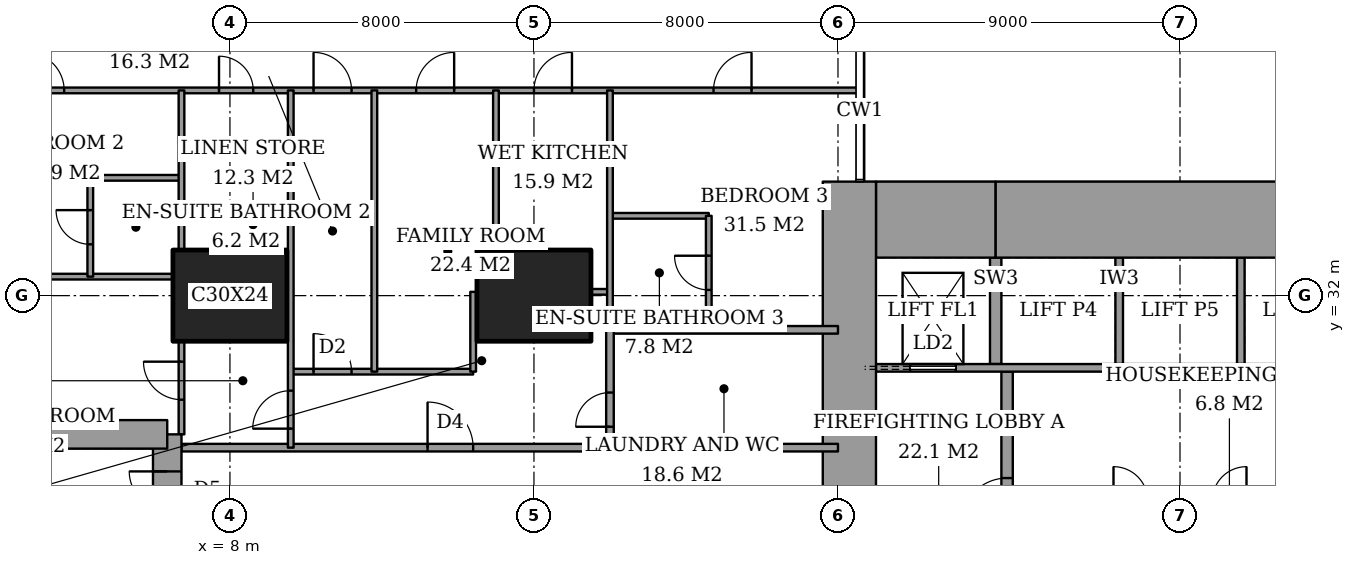
"""IFC4 building model, lengths in metres.
Left out: names, types, materials, properties, quantities, classifications, styles, units other than length and angle.
Written with IfcOpenShell. Run it as: python <this file> out.ifc"""

import sys

from ifc_helpers import new_model, si_unit, direction, frame, frame_2d, origin, origin_2d, place, context, subcontext, project, spatial, rectangle, extrude, element, fill, save


model = new_model("IFC4")
c1 = context("Model", 3, precision=1e-05, world=origin(), true_north=direction((0.0, 1.0)))
c2 = subcontext(c1, "Body", "Model", "MODEL_VIEW")
j1 = project(units=[si_unit("LENGTHUNIT", "METRE"), si_unit("PLANEANGLEUNIT", "RADIAN")], contexts=[c1])
p1 = place(None, origin())
s1 = spatial("IfcSite", under=j1, at=p1, CompositionType="ELEMENT")
p2 = place(p1, origin())
s2 = spatial("IfcBuilding", under=s1, at=p2, CompositionType="ELEMENT")
p3 = place(p2, frame((0.0, 0.0, 51.2)))
s3 = spatial("IfcBuildingStorey", under=s2, at=p3, CompositionType="ELEMENT", Elevation=51.2)
for number, where, z_axis, x_axis in (
    (1, (8.0, 32.0, 0.0), (0.0, 0.0, 1.0), (1.0, 0.0, 0.0)),
    (2, (16.0, 32.0, 0.0), (0.0, 0.0, 1.0), (1.0, 0.0, 0.0)),
):
    element("IfcColumn", number, at=place(p3, frame(where, z_axis=z_axis, x_axis=x_axis)), inside=s3, PredefinedType="COLUMN", context=c2, shape_type="SweptSolid", body=[
        extrude(rectangle(XDim=3.0, YDim=2.4, at=origin_2d()), origin(), (0.0, 0.0, 1.0), 3.6),
    ])
p4 = place(p3, frame((25.0, 34.0, 0.0), z_axis=(0.0, 0.0, 1.0), x_axis=(1.0, 0.0, 0.0)))
e3 = element("IfcWall", 3, at=p4, inside=s3, PredefinedType="SHEAR", context=c2, shape_type="SweptSolid", body=[
    extrude(rectangle(XDim=3.15, YDim=2.0, at=frame_2d((1.575, 0.0))), origin(), (0.0, 0.0, 1.0), 3.6),
])
p5 = place(p3, frame((28.15, 34.0, 0.0), z_axis=(0.0, 0.0, 1.0), x_axis=(1.0, 0.0, 0.0)))
e4 = element("IfcWall", 4, at=p5, inside=s3, PredefinedType="SHEAR", context=c2, shape_type="SweptSolid", body=[
    extrude(rectangle(XDim=9.7, YDim=2.0, at=frame_2d((4.85, 0.0))), origin(), (0.0, 0.0, 1.0), 3.6),
])
p6 = place(p3, frame((24.3, 23.15, 0.0), z_axis=(0.0, 0.0, 1.0), x_axis=(0.0, 1.0, 0.0)))
e5 = element("IfcWall", 5, at=p6, inside=s3, PredefinedType="SHEAR", context=c2, shape_type="SweptSolid", body=[
    extrude(rectangle(XDim=11.85, YDim=1.4, at=frame_2d((5.925, 0.0))), origin(), (0.0, 0.0, 1.0), 3.6),
])
p7 = place(p6, frame((0.75, 0.0, 0.0)))
e6 = element("IfcOpeningElement", 6, at=p7, cuts=e5, PredefinedType="OPENING", context=c2, shape_type="SweptSolid", body=[
    extrude(rectangle(XDim=1.8, YDim=2.4, at=frame_2d((0.9, 1.2))), frame((0.0, 0.71, 0.0), z_axis=(0.0, -1.0, 0.0), x_axis=(1.0, 0.0, 0.0)), (0.0, 0.0, 1.0), 1.42),
])
p8 = place(p3, frame((28.45, 23.3, 0.0), z_axis=(0.0, 0.0, 1.0), x_axis=(0.0, 1.0, 0.0)))
e7 = element("IfcWall", 7, at=p8, inside=s3, PredefinedType="PARTITIONING", context=c2, shape_type="SweptSolid", body=[
    extrude(rectangle(XDim=6.7, YDim=0.3, at=frame_2d((3.35, 0.0))), origin(), (0.0, 0.0, 1.0), 3.6),
])
p9 = place(p8, frame((2.7, 0.0, 0.0)))
e8 = element("IfcOpeningElement", 8, at=p9, cuts=e7, PredefinedType="OPENING", context=c2, shape_type="SweptSolid", body=[
    extrude(rectangle(XDim=1.2, YDim=2.1, at=frame_2d((0.6, 1.05))), frame((0.0, 0.16, 0.0), z_axis=(0.0, -1.0, 0.0), x_axis=(1.0, 0.0, 0.0)), (0.0, 0.0, 1.0), 0.32),
])
p10 = place(p3, frame((6.35, 19.65, 0.0), z_axis=(0.0, 0.0, 1.0), x_axis=(0.0, 1.0, 0.0)))
e9 = element("IfcWall", 9, at=p10, inside=s3, PredefinedType="SHEAR", context=c2, shape_type="SweptSolid", body=[
    extrude(rectangle(XDim=8.7, YDim=0.75, at=frame_2d((4.35, 0.0))), origin(), (0.0, 0.0, 1.0), 3.6),
])
p11 = place(p10, frame((6.725, 0.0, 0.0)))
e10 = element("IfcOpeningElement", 10, at=p11, cuts=e9, PredefinedType="OPENING", context=c2, shape_type="SweptSolid", body=[
    extrude(rectangle(XDim=1.0, YDim=2.1, at=frame_2d((0.5, 1.05))), frame((0.0, 0.385, 0.0), z_axis=(0.0, -1.0, 0.0), x_axis=(1.0, 0.0, 0.0)), (0.0, 0.0, 1.0), 0.77),
])
p12 = place(p3, frame((6.35, 28.35, 0.0), z_axis=(0.0, 0.0, 1.0), x_axis=(-1.0, 0.0, 0.0)))
e11 = element("IfcWall", 11, at=p12, inside=s3, PredefinedType="SHEAR", context=c2, shape_type="SweptSolid", body=[
    extrude(rectangle(XDim=4.45, YDim=0.75, at=frame_2d((2.225, 0.0))), origin(), (0.0, 0.0, 1.0), 3.6),
])
p13 = place(p3, frame((6.725, 28.0, 0.0), z_axis=(0.0, 0.0, 1.0), x_axis=(1.0, 0.0, 0.0)))
e12 = element("IfcWall", 12, at=p13, inside=s3, PredefinedType="PARTITIONING", context=c2, shape_type="SweptSolid", body=[
    extrude(rectangle(XDim=17.275, YDim=0.2, at=frame_2d((8.637, 0.0))), origin(), (0.0, 0.0, 1.0), 3.35),
])
p14 = place(p13, frame((6.475, 0.0, 0.0)))
e13 = element("IfcOpeningElement", 13, at=p14, cuts=e12, PredefinedType="OPENING", context=c2, shape_type="SweptSolid", body=[
    extrude(rectangle(XDim=1.2, YDim=2.4, at=frame_2d((0.6, 1.2))), frame((0.0, 0.11, 0.0), z_axis=(0.0, -1.0, 0.0), x_axis=(1.0, 0.0, 0.0)), (0.0, 0.0, 1.0), 0.22),
])
p15 = place(p3, frame((9.6, 30.0, 0.0), z_axis=(0.0, 0.0, 1.0), x_axis=(1.0, 0.0, 0.0)))
e14 = element("IfcWall", 14, at=p15, inside=s3, PredefinedType="PARTITIONING", context=c2, shape_type="SweptSolid", body=[
    extrude(rectangle(XDim=4.8, YDim=0.15, at=frame_2d((2.4, 0.0))), origin(), (0.0, 0.0, 1.0), 3.35),
])
p16 = place(p15, frame((0.6, 0.0, 0.0)))
e15 = element("IfcOpeningElement", 15, at=p16, cuts=e14, PredefinedType="OPENING", context=c2, shape_type="SweptSolid", body=[
    extrude(rectangle(XDim=1.0, YDim=2.1, at=frame_2d((0.5, 1.05))), frame((0.0, 0.085, 0.0), z_axis=(0.0, -1.0, 0.0), x_axis=(1.0, 0.0, 0.0)), (0.0, 0.0, 1.0), 0.17),
])
p17 = place(p3, frame((18.0, 31.1, 0.0), z_axis=(0.0, 0.0, 1.0), x_axis=(1.0, 0.0, 0.0)))
e16 = element("IfcWall", 16, at=p17, inside=s3, PredefinedType="PARTITIONING", context=c2, shape_type="SweptSolid", body=[
    extrude(rectangle(XDim=6.0, YDim=0.2, at=frame_2d((3.0, 0.0))), origin(), (0.0, 0.0, 1.0), 3.35),
])
p18 = place(p3, frame((17.5, 32.1, 0.0), z_axis=(0.0, 0.0, 1.0), x_axis=(1.0, 0.0, 0.0)))
e17 = element("IfcWall", 17, at=p18, inside=s3, PredefinedType="PARTITIONING", context=c2, shape_type="SweptSolid", body=[
    extrude(rectangle(XDim=0.5, YDim=0.15, at=frame_2d((0.25, 0.0))), origin(), (0.0, 0.0, 1.0), 2.634),
])
p19 = place(p3, frame((1.35, 32.5, 0.0), z_axis=(0.0, 0.0, 1.0), x_axis=(1.0, 0.0, 0.0)))
e18 = element("IfcWall", 18, at=p19, inside=s3, PredefinedType="PARTITIONING", context=c2, shape_type="SweptSolid", body=[
    extrude(rectangle(XDim=5.15, YDim=0.15, at=frame_2d((2.575, 0.0))), origin(), (0.0, 0.0, 1.0), 3.35),
])
p20 = place(p3, frame((18.0, 34.1, 0.0), z_axis=(0.0, 0.0, 1.0), x_axis=(1.0, 0.0, 0.0)))
e19 = element("IfcWall", 19, at=p20, inside=s3, PredefinedType="PARTITIONING", context=c2, shape_type="SweptSolid", body=[
    extrude(rectangle(XDim=2.6, YDim=0.15, at=frame_2d((1.3, 0.0))), origin(), (0.0, 0.0, 1.0), 3.35),
])
p21 = place(p3, frame((4.325, 35.1, 0.0), z_axis=(0.0, 0.0, 1.0), x_axis=(1.0, 0.0, 0.0)))
e20 = element("IfcWall", 20, at=p21, inside=s3, PredefinedType="PARTITIONING", context=c2, shape_type="SweptSolid", body=[
    extrude(rectangle(XDim=2.4, YDim=0.15, at=frame_2d((1.2, 0.0))), origin(), (0.0, 0.0, 1.0), 3.35),
])
p22 = place(p3, frame((-0.45, 37.4, 0.0), z_axis=(0.0, 0.0, 1.0), x_axis=(1.0, 0.0, 0.0)))
e21 = element("IfcWall", 21, at=p22, inside=s3, PredefinedType="PARTITIONING", context=c2, shape_type="SweptSolid", body=[
    extrude(rectangle(XDim=25.011, YDim=0.15, at=frame_2d((12.505, 0.0))), origin(), (0.0, 0.0, 1.0), 3.35),
])
p23 = place(p22, frame((10.65, 0.0, 0.0)))
e22 = element("IfcOpeningElement", 22, at=p23, cuts=e21, PredefinedType="OPENING", context=c2, shape_type="SweptSolid", body=[
    extrude(rectangle(XDim=1.0, YDim=2.1, at=frame_2d((0.5, 1.05))), frame((0.0, 0.085, 0.0), z_axis=(0.0, -1.0, 0.0), x_axis=(1.0, 0.0, 0.0)), (0.0, 0.0, 1.0), 0.17),
])
p24 = place(p22, frame((3.087, 0.0, 0.0)))
e23 = element("IfcOpeningElement", 23, at=p24, cuts=e21, PredefinedType="OPENING", context=c2, shape_type="SweptSolid", body=[
    extrude(rectangle(XDim=1.0, YDim=2.1, at=frame_2d((0.5, 1.05))), frame((0.0, 0.085, 0.0), z_axis=(0.0, -1.0, 0.0), x_axis=(1.0, 0.0, 0.0)), (0.0, 0.0, 1.0), 0.17),
])
p25 = place(p22, frame((8.163, 0.0, 0.0)))
e24 = element("IfcOpeningElement", 24, at=p25, cuts=e21, PredefinedType="OPENING", context=c2, shape_type="SweptSolid", body=[
    extrude(rectangle(XDim=0.9, YDim=2.1, at=frame_2d((0.45, 1.05))), frame((0.0, 0.085, 0.0), z_axis=(0.0, -1.0, 0.0), x_axis=(1.0, 0.0, 0.0)), (0.0, 0.0, 1.0), 0.17),
])
p26 = place(p22, frame((13.35, 0.0, 0.0)))
e25 = element("IfcOpeningElement", 25, at=p26, cuts=e21, PredefinedType="OPENING", context=c2, shape_type="SweptSolid", body=[
    extrude(rectangle(XDim=1.0, YDim=2.1, at=frame_2d((0.5, 1.05))), frame((0.0, 0.085, 0.0), z_axis=(0.0, -1.0, 0.0), x_axis=(1.0, 0.0, 0.0)), (0.0, 0.0, 1.0), 0.17),
])
p27 = place(p22, frame((16.45, 0.0, 0.0)))
e26 = element("IfcOpeningElement", 26, at=p27, cuts=e21, PredefinedType="OPENING", context=c2, shape_type="SweptSolid", body=[
    extrude(rectangle(XDim=1.0, YDim=2.1, at=frame_2d((0.5, 1.05))), frame((0.0, 0.085, 0.0), z_axis=(0.0, -1.0, 0.0), x_axis=(1.0, 0.0, 0.0)), (0.0, 0.0, 1.0), 0.17),
])
p28 = place(p22, frame((21.175, 0.0, 0.0)))
e27 = element("IfcOpeningElement", 27, at=p28, cuts=e21, PredefinedType="OPENING", context=c2, shape_type="SweptSolid", body=[
    extrude(rectangle(XDim=1.0, YDim=2.1, at=frame_2d((0.5, 1.05))), frame((0.0, 0.085, 0.0), z_axis=(0.0, -1.0, 0.0), x_axis=(1.0, 0.0, 0.0)), (0.0, 0.0, 1.0), 0.17),
])
p29 = place(p3, frame((4.325, 32.5, 0.0), z_axis=(0.0, 0.0, 1.0), x_axis=(0.0, 1.0, 0.0)))
e28 = element("IfcWall", 28, at=p29, inside=s3, PredefinedType="PARTITIONING", context=c2, shape_type="SweptSolid", body=[
    extrude(rectangle(XDim=2.6, YDim=0.15, at=frame_2d((1.3, 0.0))), origin(), (0.0, 0.0, 1.0), 3.35),
])
p30 = place(p29, frame((0.85, 0.0, 0.0)))
e29 = element("IfcOpeningElement", 29, at=p30, cuts=e28, PredefinedType="OPENING", context=c2, shape_type="SweptSolid", body=[
    extrude(rectangle(XDim=0.9, YDim=2.1, at=frame_2d((0.45, 1.05))), frame((0.0, 0.085, 0.0), z_axis=(0.0, -1.0, 0.0), x_axis=(1.0, 0.0, 0.0)), (0.0, 0.0, 1.0), 0.17),
])
p31 = place(p3, frame((6.725, 28.35, 0.0), z_axis=(0.0, 0.0, 1.0), x_axis=(0.0, 1.0, 0.0)))
e30 = element("IfcWall", 30, at=p31, inside=s3, PredefinedType="PARTITIONING", context=c2, shape_type="SweptSolid", body=[
    extrude(rectangle(XDim=2.45, YDim=0.15, at=frame_2d((1.225, 0.0))), origin(), (0.0, 0.0, 1.0), 3.35),
])
p32 = place(p31, frame((0.913, 0.0, 0.0)))
e31 = element("IfcOpeningElement", 31, at=p32, cuts=e30, PredefinedType="OPENING", context=c2, shape_type="SweptSolid", body=[
    extrude(rectangle(XDim=1.0, YDim=2.1, at=frame_2d((0.5, 1.05))), frame((0.0, 0.085, 0.0), z_axis=(0.0, -1.0, 0.0), x_axis=(1.0, 0.0, 0.0)), (0.0, 0.0, 1.0), 0.17),
])
p33 = place(p3, frame((6.725, 33.2, 0.0), z_axis=(0.0, 0.0, 1.0), x_axis=(0.0, 1.0, 0.0)))
e32 = element("IfcWall", 32, at=p33, inside=s3, PredefinedType="PARTITIONING", context=c2, shape_type="SweptSolid", body=[
    extrude(rectangle(XDim=4.2, YDim=0.15, at=frame_2d((2.1, 0.0))), origin(), (0.0, 0.0, 1.0), 3.35),
])
p34 = place(p3, frame((9.6, 28.0, 0.0), z_axis=(0.0, 0.0, 1.0), x_axis=(0.0, 1.0, 0.0)))
e33 = element("IfcWall", 33, at=p34, inside=s3, PredefinedType="PARTITIONING", context=c2, shape_type="SweptSolid", body=[
    extrude(rectangle(XDim=9.4, YDim=0.15, at=frame_2d((4.7, 0.0))), origin(), (0.0, 0.0, 1.0), 3.35),
])
p35 = place(p34, frame((0.5, 0.0, 0.0)))
e34 = element("IfcOpeningElement", 34, at=p35, cuts=e33, PredefinedType="OPENING", context=c2, shape_type="SweptSolid", body=[
    extrude(rectangle(XDim=1.0, YDim=2.1, at=frame_2d((0.5, 1.05))), frame((0.0, 0.085, 0.0), z_axis=(0.0, -1.0, 0.0), x_axis=(1.0, 0.0, 0.0)), (0.0, 0.0, 1.0), 0.17),
])
p36 = place(p3, frame((11.8, 30.0, 0.0), z_axis=(0.0, 0.0, 1.0), x_axis=(0.0, 1.0, 0.0)))
e35 = element("IfcWall", 35, at=p36, inside=s3, PredefinedType="PARTITIONING", context=c2, shape_type="SweptSolid", body=[
    extrude(rectangle(XDim=7.4, YDim=0.15, at=frame_2d((3.7, 0.0))), origin(), (0.0, 0.0, 1.0), 3.35),
])
p37 = place(p3, frame((14.4, 30.0, 0.0), z_axis=(0.0, 0.0, 1.0), x_axis=(0.0, 1.0, 0.0)))
e36 = element("IfcWall", 36, at=p37, inside=s3, PredefinedType="PARTITIONING", context=c2, shape_type="SweptSolid", body=[
    extrude(rectangle(XDim=2.1, YDim=0.15, at=frame_2d((1.05, 0.0))), origin(), (0.0, 0.0, 1.0), 3.35),
])
p38 = place(p3, frame((15.0, 33.2, 0.0), z_axis=(0.0, 0.0, 1.0), x_axis=(0.0, 1.0, 0.0)))
e37 = element("IfcWall", 37, at=p38, inside=s3, PredefinedType="PARTITIONING", context=c2, shape_type="SweptSolid", body=[
    extrude(rectangle(XDim=4.2, YDim=0.15, at=frame_2d((2.1, 0.0))), origin(), (0.0, 0.0, 1.0), 3.35),
])
p39 = place(p3, frame((18.0, 28.0, 0.0), z_axis=(0.0, 0.0, 1.0), x_axis=(0.0, 1.0, 0.0)))
e38 = element("IfcWall", 38, at=p39, inside=s3, PredefinedType="PARTITIONING", context=c2, shape_type="SweptSolid", body=[
    extrude(rectangle(XDim=3.1, YDim=0.2, at=frame_2d((1.55, 0.0))), origin(), (0.0, 0.0, 1.0), 3.35),
])
p40 = place(p39, frame((0.55, 0.0, 0.0)))
e39 = element("IfcOpeningElement", 39, at=p40, cuts=e38, PredefinedType="OPENING", context=c2, shape_type="SweptSolid", body=[
    extrude(rectangle(XDim=0.9, YDim=2.1, at=frame_2d((0.45, 1.05))), frame((0.0, 0.11, 0.0), z_axis=(0.0, -1.0, 0.0), x_axis=(1.0, 0.0, 0.0)), (0.0, 0.0, 1.0), 0.22),
])
p41 = place(p3, frame((18.0, 31.1, 0.0), z_axis=(0.0, 0.0, 1.0), x_axis=(0.0, 1.0, 0.0)))
e40 = element("IfcWall", 40, at=p41, inside=s3, PredefinedType="PARTITIONING", context=c2, shape_type="SweptSolid", body=[
    extrude(rectangle(XDim=6.3, YDim=0.15, at=frame_2d((3.15, 0.0))), origin(), (0.0, 0.0, 1.0), 3.35),
])
p42 = place(p3, frame((20.6, 31.1, 0.0), z_axis=(0.0, 0.0, 1.0), x_axis=(0.0, 1.0, 0.0)))
e41 = element("IfcWall", 41, at=p42, inside=s3, PredefinedType="PARTITIONING", context=c2, shape_type="SweptSolid", body=[
    extrude(rectangle(XDim=3.0, YDim=0.15, at=frame_2d((1.5, 0.0))), origin(), (0.0, 0.0, 1.0), 3.35),
])
p43 = place(p42, frame((1.05, 0.0, 0.0)))
e42 = element("IfcOpeningElement", 42, at=p43, cuts=e41, PredefinedType="OPENING", context=c2, shape_type="SweptSolid", body=[
    extrude(rectangle(XDim=0.9, YDim=2.1, at=frame_2d((0.45, 1.05))), frame((0.0, 0.085, 0.0), z_axis=(0.0, -1.0, 0.0), x_axis=(1.0, 0.0, 0.0)), (0.0, 0.0, 1.0), 0.17),
])
p44 = place(p3, frame((25.0, 30.1, 0.0), z_axis=(0.0, 0.0, 1.0), x_axis=(1.0, 0.0, 0.0)))
e43 = element("IfcWall", 43, at=p44, inside=s3, PredefinedType="PARTITIONING", context=c2, shape_type="SweptSolid", body=[
    extrude(rectangle(XDim=12.7, YDim=0.2, at=frame_2d((6.35, 0.0))), origin(), (0.0, 0.0, 1.0), 3.6),
])
p45 = place(p44, frame((0.9, 0.0, 0.0)))
e44 = element("IfcOpeningElement", 44, at=p45, cuts=e43, PredefinedType="OPENING", context=c2, shape_type="SweptSolid", body=[
    extrude(rectangle(XDim=1.2, YDim=2.1, at=frame_2d((0.6, 1.05))), frame((0.0, 0.11, 0.0), z_axis=(0.0, -1.0, 0.0), x_axis=(1.0, 0.0, 0.0)), (0.0, 0.0, 1.0), 0.22),
])
for number, where, z_axis, x_axis in (
    (45, (31.4, 30.2, 0.0), (0.0, 0.0, 1.0), (0.0, 1.0, 0.0)),
    (46, (34.6, 30.2, 0.0), (0.0, 0.0, 1.0), (0.0, 1.0, 0.0)),
):
    element("IfcWall", number, at=place(p3, frame(where, z_axis=z_axis, x_axis=x_axis)), inside=s3, PredefinedType="PARTITIONING", context=c2, shape_type="SweptSolid", body=[
        extrude(rectangle(XDim=2.8, YDim=0.2, at=frame_2d((1.4, 0.0))), origin(), (0.0, 0.0, 1.0), 3.6),
    ])
p46 = place(p3, frame((28.15, 30.2, 0.0), z_axis=(0.0, 0.0, 1.0), x_axis=(0.0, 1.0, 0.0)))
e47 = element("IfcWall", 47, at=p46, inside=s3, PredefinedType="SHEAR", context=c2, shape_type="SweptSolid", body=[
    extrude(rectangle(XDim=2.8, YDim=0.3, at=frame_2d((1.4, 0.0))), origin(), (0.0, 0.0, 1.0), 3.6),
])
p47 = place(p23, origin())
e48 = element("IfcDoor", 48, at=p47, inside=s3, OperationType="SINGLE_SWING_RIGHT", PredefinedType="DOOR", context=c2, shape_type="SweptSolid", body=[
    extrude(rectangle(XDim=1.0, YDim=2.1, at=frame_2d((0.5, 1.05))), frame((0.0, 0.025, 0.0), z_axis=(0.0, -1.0, 0.0), x_axis=(1.0, 0.0, 0.0)), (0.0, 0.0, 1.0), 0.05),
])
fill(e22, e48)
p48 = place(p30, origin())
e49 = element("IfcDoor", 49, at=p48, inside=s3, OperationType="SINGLE_SWING_LEFT", PredefinedType="DOOR", context=c2, shape_type="SweptSolid", body=[
    extrude(rectangle(XDim=0.9, YDim=2.1, at=frame_2d((0.45, 1.05))), frame((0.0, 0.025, 0.0), z_axis=(0.0, -1.0, 0.0), x_axis=(1.0, 0.0, 0.0)), (0.0, 0.0, 1.0), 0.05),
])
fill(e29, e49)
p49 = place(p24, origin())
e50 = element("IfcDoor", 50, at=p49, inside=s3, OperationType="SINGLE_SWING_RIGHT", PredefinedType="DOOR", context=c2, shape_type="SweptSolid", body=[
    extrude(rectangle(XDim=1.0, YDim=2.1, at=frame_2d((0.5, 1.05))), frame((0.0, 0.025, 0.0), z_axis=(0.0, -1.0, 0.0), x_axis=(1.0, 0.0, 0.0)), (0.0, 0.0, 1.0), 0.05),
])
fill(e23, e50)
p50 = place(p32, origin())
e51 = element("IfcDoor", 51, at=p50, inside=s3, OperationType="SINGLE_SWING_LEFT", PredefinedType="DOOR", context=c2, shape_type="SweptSolid", body=[
    extrude(rectangle(XDim=1.0, YDim=2.1, at=frame_2d((0.5, 1.05))), frame((0.0, 0.025, 0.0), z_axis=(0.0, -1.0, 0.0), x_axis=(1.0, 0.0, 0.0)), (0.0, 0.0, 1.0), 0.05),
])
fill(e31, e51)
p51 = place(p25, origin())
e52 = element("IfcDoor", 52, at=p51, inside=s3, OperationType="SINGLE_SWING_RIGHT", PredefinedType="DOOR", context=c2, shape_type="SweptSolid", body=[
    extrude(rectangle(XDim=0.9, YDim=2.1, at=frame_2d((0.45, 1.05))), frame((0.0, 0.025, 0.0), z_axis=(0.0, -1.0, 0.0), x_axis=(1.0, 0.0, 0.0)), (0.0, 0.0, 1.0), 0.05),
])
fill(e24, e52)
p52 = place(p35, origin())
e53 = element("IfcDoor", 53, at=p52, inside=s3, OperationType="SINGLE_SWING_RIGHT", PredefinedType="DOOR", context=c2, shape_type="SweptSolid", body=[
    extrude(rectangle(XDim=1.0, YDim=2.1, at=frame_2d((0.5, 1.05))), frame((0.0, 0.025, 0.0), z_axis=(0.0, -1.0, 0.0), x_axis=(1.0, 0.0, 0.0)), (0.0, 0.0, 1.0), 0.05),
])
fill(e34, e53)
p53 = place(p14, origin())
e54 = element("IfcDoor", 54, at=p53, inside=s3, OperationType="SINGLE_SWING_RIGHT", PredefinedType="DOOR", context=c2, shape_type="SweptSolid", body=[
    extrude(rectangle(XDim=1.2, YDim=2.4, at=frame_2d((0.6, 1.2))), frame((0.0, 0.025, 0.0), z_axis=(0.0, -1.0, 0.0), x_axis=(1.0, 0.0, 0.0)), (0.0, 0.0, 1.0), 0.05),
])
fill(e13, e54)
p54 = place(p16, origin())
e55 = element("IfcDoor", 55, at=p54, inside=s3, OperationType="SINGLE_SWING_RIGHT", PredefinedType="DOOR", context=c2, shape_type="SweptSolid", body=[
    extrude(rectangle(XDim=1.0, YDim=2.1, at=frame_2d((0.5, 1.05))), frame((0.0, 0.025, 0.0), z_axis=(0.0, -1.0, 0.0), x_axis=(1.0, 0.0, 0.0)), (0.0, 0.0, 1.0), 0.05),
])
fill(e15, e55)
p55 = place(p26, origin())
e56 = element("IfcDoor", 56, at=p55, inside=s3, OperationType="SINGLE_SWING_LEFT", PredefinedType="DOOR", context=c2, shape_type="SweptSolid", body=[
    extrude(rectangle(XDim=1.0, YDim=2.1, at=frame_2d((0.5, 1.05))), frame((0.0, 0.025, 0.0), z_axis=(0.0, -1.0, 0.0), x_axis=(1.0, 0.0, 0.0)), (0.0, 0.0, 1.0), 0.05),
])
fill(e25, e56)
p56 = place(p27, origin())
e57 = element("IfcDoor", 57, at=p56, inside=s3, OperationType="SINGLE_SWING_LEFT", PredefinedType="DOOR", context=c2, shape_type="SweptSolid", body=[
    extrude(rectangle(XDim=1.0, YDim=2.1, at=frame_2d((0.5, 1.05))), frame((0.0, 0.025, 0.0), z_axis=(0.0, -1.0, 0.0), x_axis=(1.0, 0.0, 0.0)), (0.0, 0.0, 1.0), 0.05),
])
fill(e26, e57)
p57 = place(p43, origin())
e58 = element("IfcDoor", 58, at=p57, inside=s3, OperationType="SINGLE_SWING_LEFT", PredefinedType="DOOR", context=c2, shape_type="SweptSolid", body=[
    extrude(rectangle(XDim=0.9, YDim=2.1, at=frame_2d((0.45, 1.05))), frame((0.0, 0.025, 0.0), z_axis=(0.0, -1.0, 0.0), x_axis=(1.0, 0.0, 0.0)), (0.0, 0.0, 1.0), 0.05),
])
fill(e42, e58)
p58 = place(p28, origin())
e59 = element("IfcDoor", 59, at=p58, inside=s3, OperationType="SINGLE_SWING_LEFT", PredefinedType="DOOR", context=c2, shape_type="SweptSolid", body=[
    extrude(rectangle(XDim=1.0, YDim=2.1, at=frame_2d((0.5, 1.05))), frame((0.0, 0.025, 0.0), z_axis=(0.0, -1.0, 0.0), x_axis=(1.0, 0.0, 0.0)), (0.0, 0.0, 1.0), 0.05),
])
fill(e27, e59)
p59 = place(p40, origin())
e60 = element("IfcDoor", 60, at=p59, inside=s3, OperationType="SINGLE_SWING_RIGHT", PredefinedType="DOOR", context=c2, shape_type="SweptSolid", body=[
    extrude(rectangle(XDim=0.9, YDim=2.1, at=frame_2d((0.45, 1.05))), frame((0.0, 0.025, 0.0), z_axis=(0.0, -1.0, 0.0), x_axis=(1.0, 0.0, 0.0)), (0.0, 0.0, 1.0), 0.05),
])
fill(e39, e60)
p60 = place(p9, origin())
e61 = element("IfcDoor", 61, at=p60, inside=s3, OperationType="SINGLE_SWING_RIGHT", PredefinedType="DOOR", context=c2, shape_type="SweptSolid", body=[
    extrude(rectangle(XDim=1.2, YDim=2.1, at=frame_2d((0.6, 1.05))), frame((0.0, 0.025, 0.0), z_axis=(0.0, -1.0, 0.0), x_axis=(1.0, 0.0, 0.0)), (0.0, 0.0, 1.0), 0.05),
])
fill(e8, e61)
p61 = place(p45, origin())
e62 = element("IfcDoor", 62, at=p61, inside=s3, OperationType="SLIDING_TO_LEFT", PredefinedType="DOOR", context=c2, shape_type="SweptSolid", body=[
    extrude(rectangle(XDim=1.2, YDim=2.1, at=frame_2d((0.6, 1.05))), frame((0.0, 0.025, 0.0), z_axis=(0.0, -1.0, 0.0), x_axis=(1.0, 0.0, 0.0)), (0.0, 0.0, 1.0), 0.05),
])
fill(e44, e62)
p62 = place(p11, origin())
e63 = element("IfcDoor", 63, at=p62, inside=s3, OperationType="SINGLE_SWING_LEFT", PredefinedType="DOOR", context=c2, shape_type="SweptSolid", body=[
    extrude(rectangle(XDim=1.0, YDim=2.1, at=frame_2d((0.5, 1.05))), frame((0.0, 0.025, 0.0), z_axis=(0.0, -1.0, 0.0), x_axis=(1.0, 0.0, 0.0)), (0.0, 0.0, 1.0), 0.05),
])
fill(e10, e63)
save(model, sys.argv[1])
